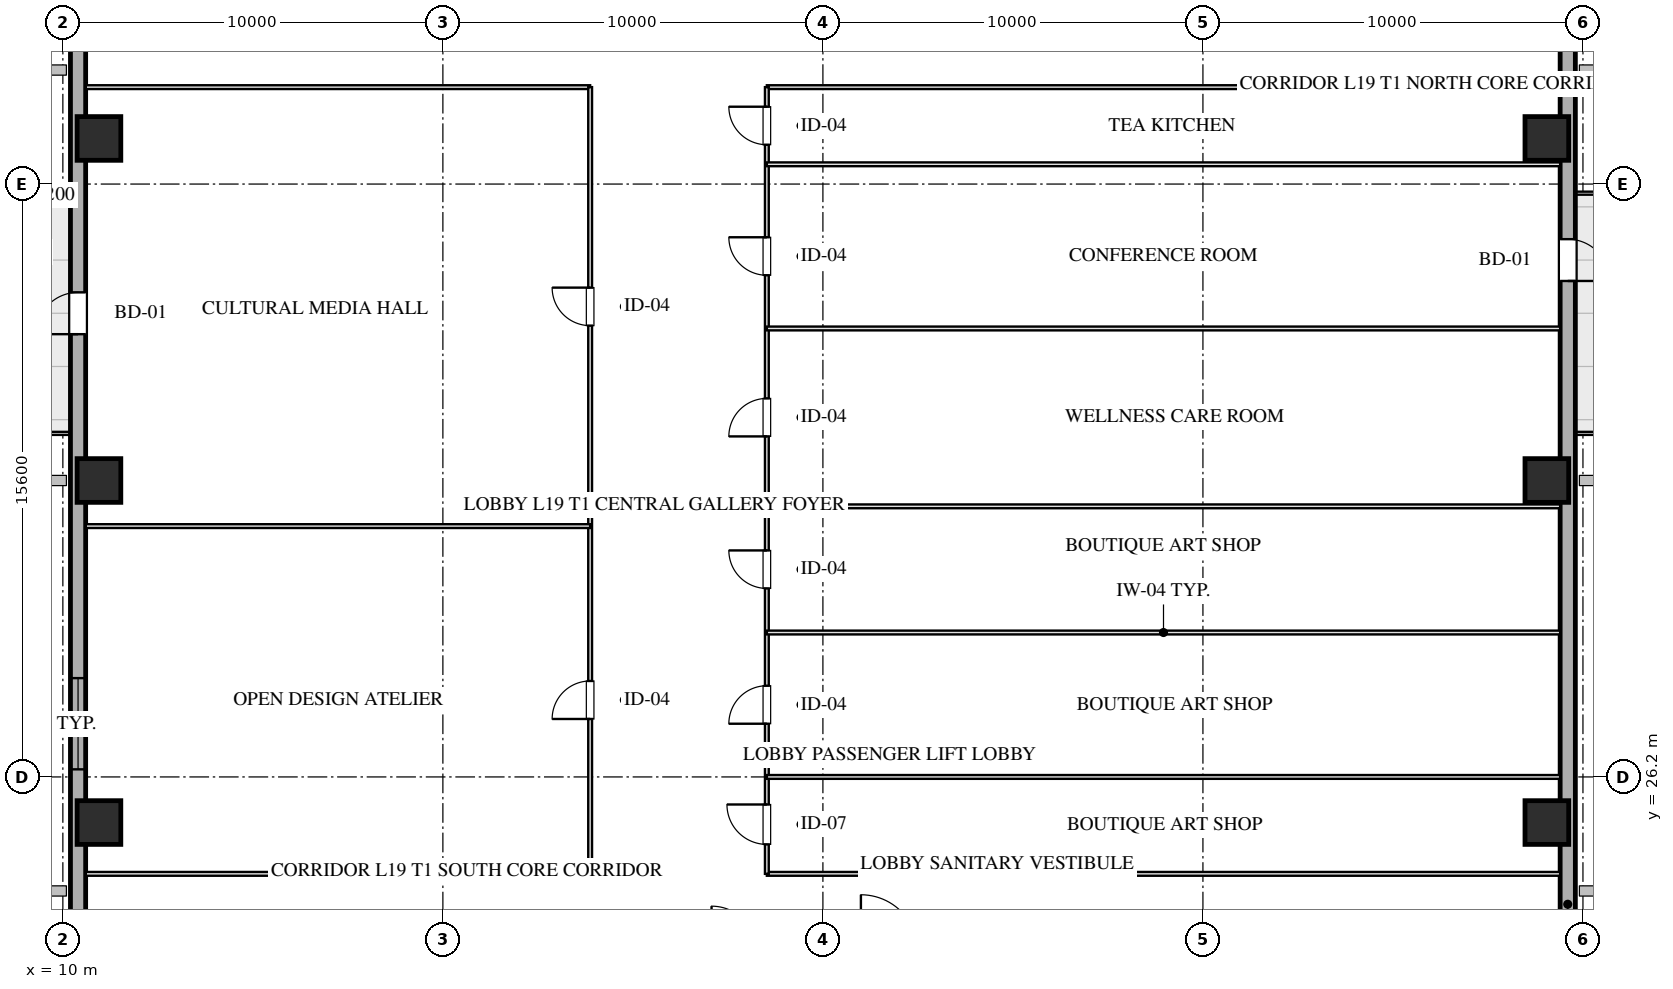
"""IFC4 building model, lengths in metres.
Left out: names, types, materials, properties, quantities, classifications, styles, units other than length and angle.
Written with IfcOpenShell. Run it as: python <this file> out.ifc"""

import sys

from ifc_helpers import new_model, si_unit, direction, frame, frame_2d, origin, origin_2d, place, context, subcontext, project, spatial, rectangle, hollow_rectangle, extrude, element, fill, save


model = new_model("IFC4")
c1 = context("Model", 3, precision=1e-05, world=origin(), true_north=direction((0.0, 1.0)))
c2 = subcontext(c1, "Body", "Model", "MODEL_VIEW")
j1 = project(units=[si_unit("LENGTHUNIT", "METRE"), si_unit("PLANEANGLEUNIT", "RADIAN")], contexts=[c1])
p1 = place(None, origin())
s1 = spatial("IfcSite", under=j1, at=p1, CompositionType="ELEMENT")
p2 = place(p1, origin())
s2 = spatial("IfcBuilding", under=s1, at=p2, CompositionType="ELEMENT")
p3 = place(p2, frame((0.0, 0.0, 78.2)))
s3 = spatial("IfcBuildingStorey", under=s2, at=p3, CompositionType="ELEMENT", Elevation=78.2)
for number, where, z_axis, x_axis in (
    (1, (10.95, 25.0, 0.0), (0.0, 0.0, 1.0), (1.0, 0.0, 0.0)),
    (2, (10.95, 34.0, 0.0), (0.0, 0.0, 1.0), (1.0, 0.0, 0.0)),
    (3, (10.95, 43.0, 0.0), (0.0, 0.0, 1.0), (1.0, 0.0, 0.0)),
    (4, (49.05, 25.0, 0.0), (0.0, 0.0, 1.0), (1.0, 0.0, 0.0)),
    (5, (49.05, 34.0, 0.0), (0.0, 0.0, 1.0), (1.0, 0.0, 0.0)),
    (6, (49.05, 43.0, 0.0), (0.0, 0.0, 1.0), (1.0, 0.0, 0.0)),
):
    element("IfcColumn", number, at=place(p3, frame(where, z_axis=z_axis, x_axis=x_axis)), inside=s3, PredefinedType="COLUMN", context=c2, shape_type="SweptSolid", body=[
        extrude(hollow_rectangle(XDim=1.15, YDim=1.15, WallThickness=0.04, at=origin_2d()), origin(), (0.0, 0.0, 1.0), 3.451),
    ])
p4 = place(p3, frame((10.4, 7.2, 0.0), z_axis=(0.0, 0.0, 1.0), x_axis=(0.0, 1.0, 0.0)))
e7 = element("IfcWall", 7, at=p4, inside=s3, PredefinedType="SOLIDWALL", context=c2, shape_type="SweptSolid", body=[
    extrude(rectangle(XDim=53.6, YDim=0.4, at=frame_2d((26.8, 0.0))), origin(), (0.0, 0.0, 1.0), 2.61),
])
p5 = place(p4, frame((19.2, 0.0, 0.75)))
e8 = element("IfcOpeningElement", 8, at=p5, cuts=e7, PredefinedType="OPENING", context=c2, shape_type="SweptSolid", body=[
    extrude(rectangle(XDim=2.4, YDim=1.46, at=frame_2d((1.2, 0.73))), frame((0.0, 0.21, 0.0), z_axis=(0.0, -1.0, 0.0), x_axis=(1.0, 0.0, 0.0)), (0.0, 0.0, 1.0), 0.42),
])
p6 = place(p4, frame((30.65, 0.0, 0.0)))
e9 = element("IfcOpeningElement", 9, at=p6, cuts=e7, PredefinedType="OPENING", context=c2, shape_type="SweptSolid", body=[
    extrude(rectangle(XDim=1.1, YDim=2.15, at=frame_2d((0.55, 1.075))), frame((0.0, 0.21, 0.0), z_axis=(0.0, -1.0, 0.0), x_axis=(1.0, 0.0, 0.0)), (0.0, 0.0, 1.0), 0.42),
])
p7 = place(p3, frame((49.6, 60.8, 0.0), z_axis=(0.0, 0.0, 1.0), x_axis=(0.0, -1.0, 0.0)))
e10 = element("IfcWall", 10, at=p7, inside=s3, PredefinedType="SOLIDWALL", context=c2, shape_type="SweptSolid", body=[
    extrude(rectangle(XDim=53.6, YDim=0.4, at=frame_2d((26.8, 0.0))), origin(), (0.0, 0.0, 1.0), 2.61),
])
p8 = place(p7, frame((20.45, 0.0, 0.0)))
e11 = element("IfcOpeningElement", 11, at=p8, cuts=e10, PredefinedType="OPENING", context=c2, shape_type="SweptSolid", body=[
    extrude(rectangle(XDim=1.1, YDim=2.15, at=frame_2d((0.55, 1.075))), frame((0.0, 0.21, 0.0), z_axis=(0.0, -1.0, 0.0), x_axis=(1.0, 0.0, 0.0)), (0.0, 0.0, 1.0), 0.42),
])
p9 = place(p3, frame((10.6, 23.65, 0.0), z_axis=(0.0, 0.0, 1.0), x_axis=(1.0, 0.0, 0.0)))
e12 = element("IfcWall", 12, at=p9, inside=s3, PredefinedType="MOVABLE", context=c2, shape_type="SweptSolid", body=[
    extrude(rectangle(XDim=13.275, YDim=0.1, at=frame_2d((6.637, 0.0))), origin(), (0.0, 0.0, 1.0), 3.175),
])
p10 = place(p3, frame((28.525, 23.65, 0.0), z_axis=(0.0, 0.0, 1.0), x_axis=(1.0, 0.0, 0.0)))
e13 = element("IfcWall", 13, at=p10, inside=s3, PredefinedType="MOVABLE", context=c2, shape_type="SweptSolid", body=[
    extrude(rectangle(XDim=20.875, YDim=0.1, at=frame_2d((10.438, 0.0))), origin(), (0.0, 0.0, 1.0), 3.175),
])
p11 = place(p3, frame((10.6, 44.35, 0.0), z_axis=(0.0, 0.0, 1.0), x_axis=(1.0, 0.0, 0.0)))
e14 = element("IfcWall", 14, at=p11, inside=s3, PredefinedType="MOVABLE", context=c2, shape_type="SweptSolid", body=[
    extrude(rectangle(XDim=13.275, YDim=0.1, at=frame_2d((6.637, 0.0))), origin(), (0.0, 0.0, 1.0), 3.175),
])
p12 = place(p3, frame((28.525, 44.35, 0.0), z_axis=(0.0, 0.0, 1.0), x_axis=(1.0, 0.0, 0.0)))
e15 = element("IfcWall", 15, at=p12, inside=s3, PredefinedType="MOVABLE", context=c2, shape_type="SweptSolid", body=[
    extrude(rectangle(XDim=20.875, YDim=0.1, at=frame_2d((10.438, 0.0))), origin(), (0.0, 0.0, 1.0), 3.175),
])
p13 = place(p3, frame((23.875, 23.65, 0.0), z_axis=(0.0, 0.0, 1.0), x_axis=(0.0, 1.0, 0.0)))
e16 = element("IfcWall", 16, at=p13, inside=s3, PredefinedType="MOVABLE", context=c2, shape_type="SweptSolid", body=[
    extrude(rectangle(XDim=20.7, YDim=0.1, at=frame_2d((10.35, 0.0))), origin(), (0.0, 0.0, 1.0), 3.175),
])
p14 = place(p13, frame((4.075, 0.0, 0.0)))
e17 = element("IfcOpeningElement", 17, at=p14, cuts=e16, PredefinedType="OPENING", context=c2, shape_type="SweptSolid", body=[
    extrude(rectangle(XDim=1.0, YDim=2.05, at=frame_2d((0.5, 1.025))), frame((0.0, 0.06, 0.0), z_axis=(0.0, -1.0, 0.0), x_axis=(1.0, 0.0, 0.0)), (0.0, 0.0, 1.0), 0.12),
])
p15 = place(p13, frame((14.425, 0.0, 0.0)))
e18 = element("IfcOpeningElement", 18, at=p15, cuts=e16, PredefinedType="OPENING", context=c2, shape_type="SweptSolid", body=[
    extrude(rectangle(XDim=1.0, YDim=2.05, at=frame_2d((0.5, 1.025))), frame((0.0, 0.06, 0.0), z_axis=(0.0, -1.0, 0.0), x_axis=(1.0, 0.0, 0.0)), (0.0, 0.0, 1.0), 0.12),
])
p16 = place(p3, frame((28.525, 23.65, 0.0), z_axis=(0.0, 0.0, 1.0), x_axis=(0.0, 1.0, 0.0)))
e19 = element("IfcWall", 19, at=p16, inside=s3, PredefinedType="MOVABLE", context=c2, shape_type="SweptSolid", body=[
    extrude(rectangle(XDim=20.7, YDim=0.1, at=frame_2d((10.35, 0.0))), origin(), (0.0, 0.0, 1.0), 3.175),
])
p17 = place(p16, frame((0.775, 0.0, 0.0)))
e20 = element("IfcOpeningElement", 20, at=p17, cuts=e19, PredefinedType="OPENING", context=c2, shape_type="SweptSolid", body=[
    extrude(rectangle(XDim=1.05, YDim=2.05, at=frame_2d((0.525, 1.025))), frame((0.0, 0.06, 0.0), z_axis=(0.0, -1.0, 0.0), x_axis=(1.0, 0.0, 0.0)), (0.0, 0.0, 1.0), 0.12),
])
p18 = place(p16, frame((3.95, 0.0, 0.0)))
e21 = element("IfcOpeningElement", 21, at=p18, cuts=e19, PredefinedType="OPENING", context=c2, shape_type="SweptSolid", body=[
    extrude(rectangle(XDim=1.0, YDim=2.05, at=frame_2d((0.5, 1.025))), frame((0.0, 0.06, 0.0), z_axis=(0.0, -1.0, 0.0), x_axis=(1.0, 0.0, 0.0)), (0.0, 0.0, 1.0), 0.12),
])
p19 = place(p16, frame((7.51, 0.0, 0.0)))
e22 = element("IfcOpeningElement", 22, at=p19, cuts=e19, PredefinedType="OPENING", context=c2, shape_type="SweptSolid", body=[
    extrude(rectangle(XDim=1.0, YDim=2.05, at=frame_2d((0.5, 1.025))), frame((0.0, 0.06, 0.0), z_axis=(0.0, -1.0, 0.0), x_axis=(1.0, 0.0, 0.0)), (0.0, 0.0, 1.0), 0.12),
])
p20 = place(p16, frame((11.51, 0.0, 0.0)))
e23 = element("IfcOpeningElement", 23, at=p20, cuts=e19, PredefinedType="OPENING", context=c2, shape_type="SweptSolid", body=[
    extrude(rectangle(XDim=1.0, YDim=2.05, at=frame_2d((0.5, 1.025))), frame((0.0, 0.06, 0.0), z_axis=(0.0, -1.0, 0.0), x_axis=(1.0, 0.0, 0.0)), (0.0, 0.0, 1.0), 0.12),
])
p21 = place(p16, frame((15.75, 0.0, 0.0)))
e24 = element("IfcOpeningElement", 24, at=p21, cuts=e19, PredefinedType="OPENING", context=c2, shape_type="SweptSolid", body=[
    extrude(rectangle(XDim=1.0, YDim=2.05, at=frame_2d((0.5, 1.025))), frame((0.0, 0.06, 0.0), z_axis=(0.0, -1.0, 0.0), x_axis=(1.0, 0.0, 0.0)), (0.0, 0.0, 1.0), 0.12),
])
p22 = place(p16, frame((19.185, 0.0, 0.0)))
e25 = element("IfcOpeningElement", 25, at=p22, cuts=e19, PredefinedType="OPENING", context=c2, shape_type="SweptSolid", body=[
    extrude(rectangle(XDim=1.0, YDim=2.05, at=frame_2d((0.5, 1.025))), frame((0.0, 0.06, 0.0), z_axis=(0.0, -1.0, 0.0), x_axis=(1.0, 0.0, 0.0)), (0.0, 0.0, 1.0), 0.12),
])
p23 = place(p3, frame((10.6, 32.8, 0.0), z_axis=(0.0, 0.0, 1.0), x_axis=(1.0, 0.0, 0.0)))
e26 = element("IfcWall", 26, at=p23, inside=s3, PredefinedType="MOVABLE", context=c2, shape_type="SweptSolid", body=[
    extrude(rectangle(XDim=13.275, YDim=0.1, at=frame_2d((6.637, 0.0))), origin(), (0.0, 0.0, 1.0), 3.175),
])
for number, where, z_axis, x_axis in (
    (27, (28.525, 26.2, 0.0), (0.0, 0.0, 1.0), (1.0, 0.0, 0.0)),
    (28, (28.525, 30.0, 0.0), (0.0, 0.0, 1.0), (1.0, 0.0, 0.0)),
    (29, (28.525, 33.32, 0.0), (0.0, 0.0, 1.0), (1.0, 0.0, 0.0)),
    (30, (28.525, 38.0, 0.0), (0.0, 0.0, 1.0), (1.0, 0.0, 0.0)),
    (31, (28.525, 42.32, 0.0), (0.0, 0.0, 1.0), (1.0, 0.0, 0.0)),
):
    element("IfcWall", number, at=place(p3, frame(where, z_axis=z_axis, x_axis=x_axis)), inside=s3, PredefinedType="MOVABLE", context=c2, shape_type="SweptSolid", body=[
        extrude(rectangle(XDim=20.875, YDim=0.1, at=frame_2d((10.438, 0.0))), origin(), (0.0, 0.0, 1.0), 3.175),
    ])
p24 = place(p5, origin())
e32 = element("IfcWindow", 32, at=p24, inside=s3, PartitioningType="TRIPLE_PANEL_VERTICAL", PredefinedType="WINDOW", context=c2, shape_type="SweptSolid", body=[
    extrude(rectangle(XDim=2.4, YDim=1.46, at=frame_2d((1.2, 0.73))), frame((0.0, 0.03, 0.0), z_axis=(0.0, -1.0, 0.0), x_axis=(1.0, 0.0, 0.0)), (0.0, 0.0, 1.0), 0.06),
])
fill(e8, e32)
p25 = place(p6, origin())
e33 = element("IfcDoor", 33, at=p25, inside=s3, OperationType="SINGLE_SWING_LEFT", PredefinedType="DOOR", context=c2, shape_type="SweptSolid", body=[
    extrude(rectangle(XDim=1.1, YDim=2.15, at=frame_2d((0.55, 1.075))), frame((0.0, 0.025, 0.0), z_axis=(0.0, -1.0, 0.0), x_axis=(1.0, 0.0, 0.0)), (0.0, 0.0, 1.0), 0.05),
])
fill(e9, e33)
p26 = place(p8, origin())
e34 = element("IfcDoor", 34, at=p26, inside=s3, OperationType="SINGLE_SWING_RIGHT", PredefinedType="DOOR", context=c2, shape_type="SweptSolid", body=[
    extrude(rectangle(XDim=1.1, YDim=2.15, at=frame_2d((0.55, 1.075))), frame((0.0, 0.025, 0.0), z_axis=(0.0, -1.0, 0.0), x_axis=(1.0, 0.0, 0.0)), (0.0, 0.0, 1.0), 0.05),
])
fill(e11, e34)
p27 = place(p14, origin())
e35 = element("IfcDoor", 35, at=p27, inside=s3, OperationType="SINGLE_SWING_LEFT", PredefinedType="DOOR", context=c2, shape_type="SweptSolid", body=[
    extrude(rectangle(XDim=1.0, YDim=2.05, at=frame_2d((0.5, 1.025))), frame((0.0, 0.025, 0.0), z_axis=(0.0, -1.0, 0.0), x_axis=(1.0, 0.0, 0.0)), (0.0, 0.0, 1.0), 0.05),
])
fill(e17, e35)
p28 = place(p15, origin())
e36 = element("IfcDoor", 36, at=p28, inside=s3, OperationType="SINGLE_SWING_RIGHT", PredefinedType="DOOR", context=c2, shape_type="SweptSolid", body=[
    extrude(rectangle(XDim=1.0, YDim=2.05, at=frame_2d((0.5, 1.025))), frame((0.0, 0.025, 0.0), z_axis=(0.0, -1.0, 0.0), x_axis=(1.0, 0.0, 0.0)), (0.0, 0.0, 1.0), 0.05),
])
fill(e18, e36)
p29 = place(p17, origin())
e37 = element("IfcDoor", 37, at=p29, inside=s3, OperationType="SINGLE_SWING_RIGHT", PredefinedType="DOOR", context=c2, shape_type="SweptSolid", body=[
    extrude(rectangle(XDim=1.05, YDim=2.05, at=frame_2d((0.525, 1.025))), frame((0.0, 0.025, 0.0), z_axis=(0.0, -1.0, 0.0), x_axis=(1.0, 0.0, 0.0)), (0.0, 0.0, 1.0), 0.05),
])
fill(e20, e37)
p30 = place(p18, origin())
e38 = element("IfcDoor", 38, at=p30, inside=s3, OperationType="SINGLE_SWING_LEFT", PredefinedType="DOOR", context=c2, shape_type="SweptSolid", body=[
    extrude(rectangle(XDim=1.0, YDim=2.05, at=frame_2d((0.5, 1.025))), frame((0.0, 0.025, 0.0), z_axis=(0.0, -1.0, 0.0), x_axis=(1.0, 0.0, 0.0)), (0.0, 0.0, 1.0), 0.05),
])
fill(e21, e38)
p31 = place(p19, origin())
e39 = element("IfcDoor", 39, at=p31, inside=s3, OperationType="SINGLE_SWING_RIGHT", PredefinedType="DOOR", context=c2, shape_type="SweptSolid", body=[
    extrude(rectangle(XDim=1.0, YDim=2.05, at=frame_2d((0.5, 1.025))), frame((0.0, 0.025, 0.0), z_axis=(0.0, -1.0, 0.0), x_axis=(1.0, 0.0, 0.0)), (0.0, 0.0, 1.0), 0.05),
])
fill(e22, e39)
p32 = place(p20, origin())
e40 = element("IfcDoor", 40, at=p32, inside=s3, OperationType="SINGLE_SWING_LEFT", PredefinedType="DOOR", context=c2, shape_type="SweptSolid", body=[
    extrude(rectangle(XDim=1.0, YDim=2.05, at=frame_2d((0.5, 1.025))), frame((0.0, 0.025, 0.0), z_axis=(0.0, -1.0, 0.0), x_axis=(1.0, 0.0, 0.0)), (0.0, 0.0, 1.0), 0.05),
])
fill(e23, e40)
p33 = place(p21, origin())
e41 = element("IfcDoor", 41, at=p33, inside=s3, OperationType="SINGLE_SWING_RIGHT", PredefinedType="DOOR", context=c2, shape_type="SweptSolid", body=[
    extrude(rectangle(XDim=1.0, YDim=2.05, at=frame_2d((0.5, 1.025))), frame((0.0, 0.025, 0.0), z_axis=(0.0, -1.0, 0.0), x_axis=(1.0, 0.0, 0.0)), (0.0, 0.0, 1.0), 0.05),
])
fill(e24, e41)
p34 = place(p22, origin())
e42 = element("IfcDoor", 42, at=p34, inside=s3, OperationType="SINGLE_SWING_RIGHT", PredefinedType="DOOR", context=c2, shape_type="SweptSolid", body=[
    extrude(rectangle(XDim=1.0, YDim=2.05, at=frame_2d((0.5, 1.025))), frame((0.0, 0.025, 0.0), z_axis=(0.0, -1.0, 0.0), x_axis=(1.0, 0.0, 0.0)), (0.0, 0.0, 1.0), 0.05),
])
fill(e25, e42)
save(model, sys.argv[1])
